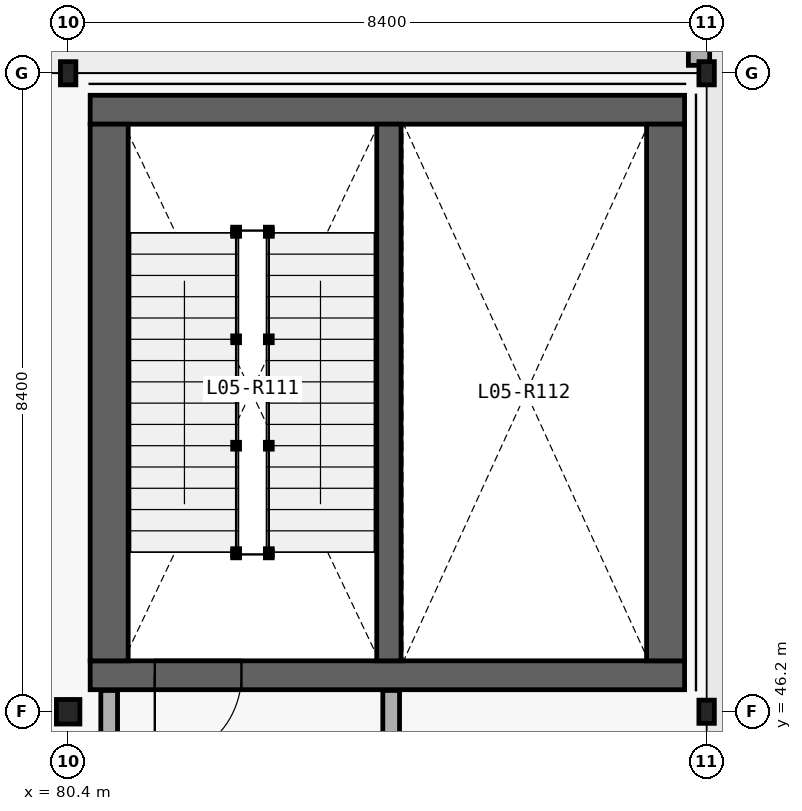
"""IFC4 building model, lengths in metres.
Left out: names, types, materials, properties, quantities, classifications, styles, units other than length and angle.
Written with IfcOpenShell. Run it as: python <this file> out.ifc"""

import sys

from ifc_helpers import new_model, si_unit, direction, frame, frame_2d, origin_with_axes, origin_2d_with_axis, place, context, subcontext, project, spatial, rectangle, hollow_rectangle, i_section, extrude, element, fill, save


model = new_model("IFC4")
c1 = context("Model", 3, precision=1e-05, world=origin_with_axes(), true_north=direction((0.0, 1.0)))
c2 = subcontext(c1, "Body", "Model", "MODEL_VIEW")
j1 = project(units=[si_unit("LENGTHUNIT", "METRE"), si_unit("PLANEANGLEUNIT", "RADIAN")], contexts=[c1])
p1 = place(None, origin_with_axes())
s1 = spatial("IfcSite", under=j1, at=p1, CompositionType="ELEMENT")
p2 = place(p1, origin_with_axes())
s2 = spatial("IfcBuilding", under=s1, at=p2, CompositionType="ELEMENT")
p3 = place(p2, frame((0.0, 0.0, 24.9), z_axis=(0.0, 0.0, 1.0), x_axis=(1.0, 0.0, 0.0)))
s3 = spatial("IfcBuildingStorey", under=s2, at=p3, CompositionType="ELEMENT", Elevation=24.9)
p4 = place(None, frame((88.7, 61.7, 24.9), z_axis=(0.0, 0.0, 1.0), x_axis=(0.0, -1.0, 0.0)))
e1 = element("IfcWall", 1, at=p4, inside=s3, PredefinedType="PARAPET", context=c2, shape_type="SweptSolid", body=[
    extrude(rectangle(XDim=6.996, YDim=0.28, at=frame_2d((3.498, 0.0), x_axis=(1.0, 0.0))), origin_with_axes(), (0.0, 0.0, 1.0), 1.12),
])
p5 = place(None, frame((80.69, 46.68, 24.9), z_axis=(0.0, 0.0, 1.0), x_axis=(1.0, 0.0, 0.0)))
e2 = element("IfcWall", 2, at=p5, inside=s3, PredefinedType="SHEAR", context=c2, shape_type="SweptSolid", body=[
    extrude(rectangle(XDim=7.82, YDim=0.38, at=frame_2d((3.91, 0.0), x_axis=(1.0, 0.0))), origin_with_axes(), (0.0, 0.0, 1.0), 4.8),
])
p6 = place(None, frame((82.11, 46.68, 24.9), z_axis=(0.0, 0.0, 1.0), x_axis=(1.0, 0.0, 0.0)))
e3 = element("IfcOpeningElement", 3, at=p6, cuts=e2, PredefinedType="OPENING", context=c2, shape_type="SweptSolid", body=[
    extrude(rectangle(XDim=1.14, YDim=2.18, at=frame_2d((0.0, 1.09), x_axis=(1.0, 0.0))), frame((0.0, 0.2, 0.0), z_axis=(0.0, -1.0, 0.0), x_axis=(1.0, 0.0, 0.0)), (0.0, 0.0, 1.0), 0.4),
])
p7 = place(None, frame((88.51, 54.12, 24.9), z_axis=(0.0, 0.0, 1.0), x_axis=(-1.0, 0.0, 0.0)))
e4 = element("IfcWall", 4, at=p7, inside=s3, PredefinedType="SHEAR", context=c2, shape_type="SweptSolid", body=[
    extrude(rectangle(XDim=7.82, YDim=0.38, at=frame_2d((3.91, 0.0), x_axis=(1.0, 0.0))), origin_with_axes(), (0.0, 0.0, 1.0), 4.8),
])
for number, where, z_axis, x_axis in (
    (5, (88.26, 46.87, 24.9), (0.0, 0.0, 1.0), (0.0, 1.0, 0.0)),
    (6, (80.94, 53.93, 24.9), (0.0, 0.0, 1.0), (0.0, -1.0, 0.0)),
):
    element("IfcWall", number, at=place(None, frame(where, z_axis=z_axis, x_axis=x_axis)), inside=s3, PredefinedType="SHEAR", context=c2, shape_type="SweptSolid", body=[
        extrude(rectangle(XDim=7.06, YDim=0.5, at=frame_2d((3.53, 0.0), x_axis=(1.0, 0.0))), origin_with_axes(), (0.0, 0.0, 1.0), 4.8),
    ])
p8 = place(None, frame((84.62, 46.87, 24.9), z_axis=(0.0, 0.0, 1.0), x_axis=(0.0, 1.0, 0.0)))
e7 = element("IfcWall", 7, at=p8, inside=s3, PredefinedType="SHEAR", context=c2, shape_type="SweptSolid", body=[
    extrude(rectangle(XDim=7.06, YDim=0.32, at=frame_2d((3.53, 0.0), x_axis=(1.0, 0.0))), origin_with_axes(), (0.0, 0.0, 1.0), 4.8),
])
for number, where, z_axis, x_axis in (
    (8, (80.94, 45.22, 24.9), (0.0, 0.0, 1.0), (0.0, 1.0, 0.0)),
    (9, (84.65, 45.22, 24.9), (0.0, 0.0, 1.0), (0.0, 1.0, 0.0)),
):
    element("IfcWall", number, at=place(None, frame(where, z_axis=z_axis, x_axis=x_axis)), inside=s3, PredefinedType="PARTITIONING", context=c2, shape_type="SweptSolid", body=[
        extrude(rectangle(XDim=1.26, YDim=0.22, at=frame_2d((0.63, 0.0), x_axis=(1.0, 0.0))), origin_with_axes(), (0.0, 0.0, 1.0), 4.44),
    ])
p9 = place(None, frame((80.4, 46.2, 24.9), z_axis=(0.0, 0.0, 1.0), x_axis=(1.0, 0.0, 0.0)))
e10 = element("IfcColumn", 10, at=p9, inside=s3, PredefinedType="COLUMN", context=c2, shape_type="SweptSolid", body=[
    extrude(i_section(OverallWidth=0.309, OverallDepth=0.323, WebThickness=0.014, FlangeThickness=0.023, at=origin_2d_with_axis()), origin_with_axes(), (0.0, 0.0, 1.0), 4.8),
])
for number, where, z_axis, x_axis in (
    (11, (80.4, 54.6, 24.9), (0.0, 0.0, 1.0), (1.0, 0.0, 0.0)),
    (12, (88.8, 46.2, 24.9), (0.0, 0.0, 1.0), (1.0, 0.0, 0.0)),
    (13, (88.8, 54.6, 24.9), (0.0, 0.0, 1.0), (1.0, 0.0, 0.0)),
):
    element("IfcColumn", number, at=place(None, frame(where, z_axis=z_axis, x_axis=x_axis)), inside=s3, PredefinedType="COLUMN", context=c2, shape_type="SweptSolid", body=[
        extrude(hollow_rectangle(XDim=0.203, YDim=0.305, WallThickness=0.013, InnerFilletRadius=0.025, OuterFilletRadius=0.013, at=origin_2d_with_axis()), origin_with_axes(), (0.0, 0.0, 1.0), 4.8),
    ])
p10 = place(None, frame((82.11, 46.68, 24.9), z_axis=(0.0, 0.0, 1.0), x_axis=(-1.0, 0.0, 0.0)))
e14 = element("IfcDoor", 14, at=p10, inside=s3, OperationType="SINGLE_SWING_LEFT", PredefinedType="DOOR", context=c2, shape_type="SweptSolid", body=[
    extrude(rectangle(XDim=1.14, YDim=2.18, at=frame_2d((0.0, 1.09), x_axis=(1.0, 0.0))), frame((0.0, 0.04, 0.0), z_axis=(0.0, -1.0, 0.0), x_axis=(1.0, 0.0, 0.0)), (0.0, 0.0, 1.0), 0.08),
])
fill(e3, e14)
save(model, sys.argv[1])
